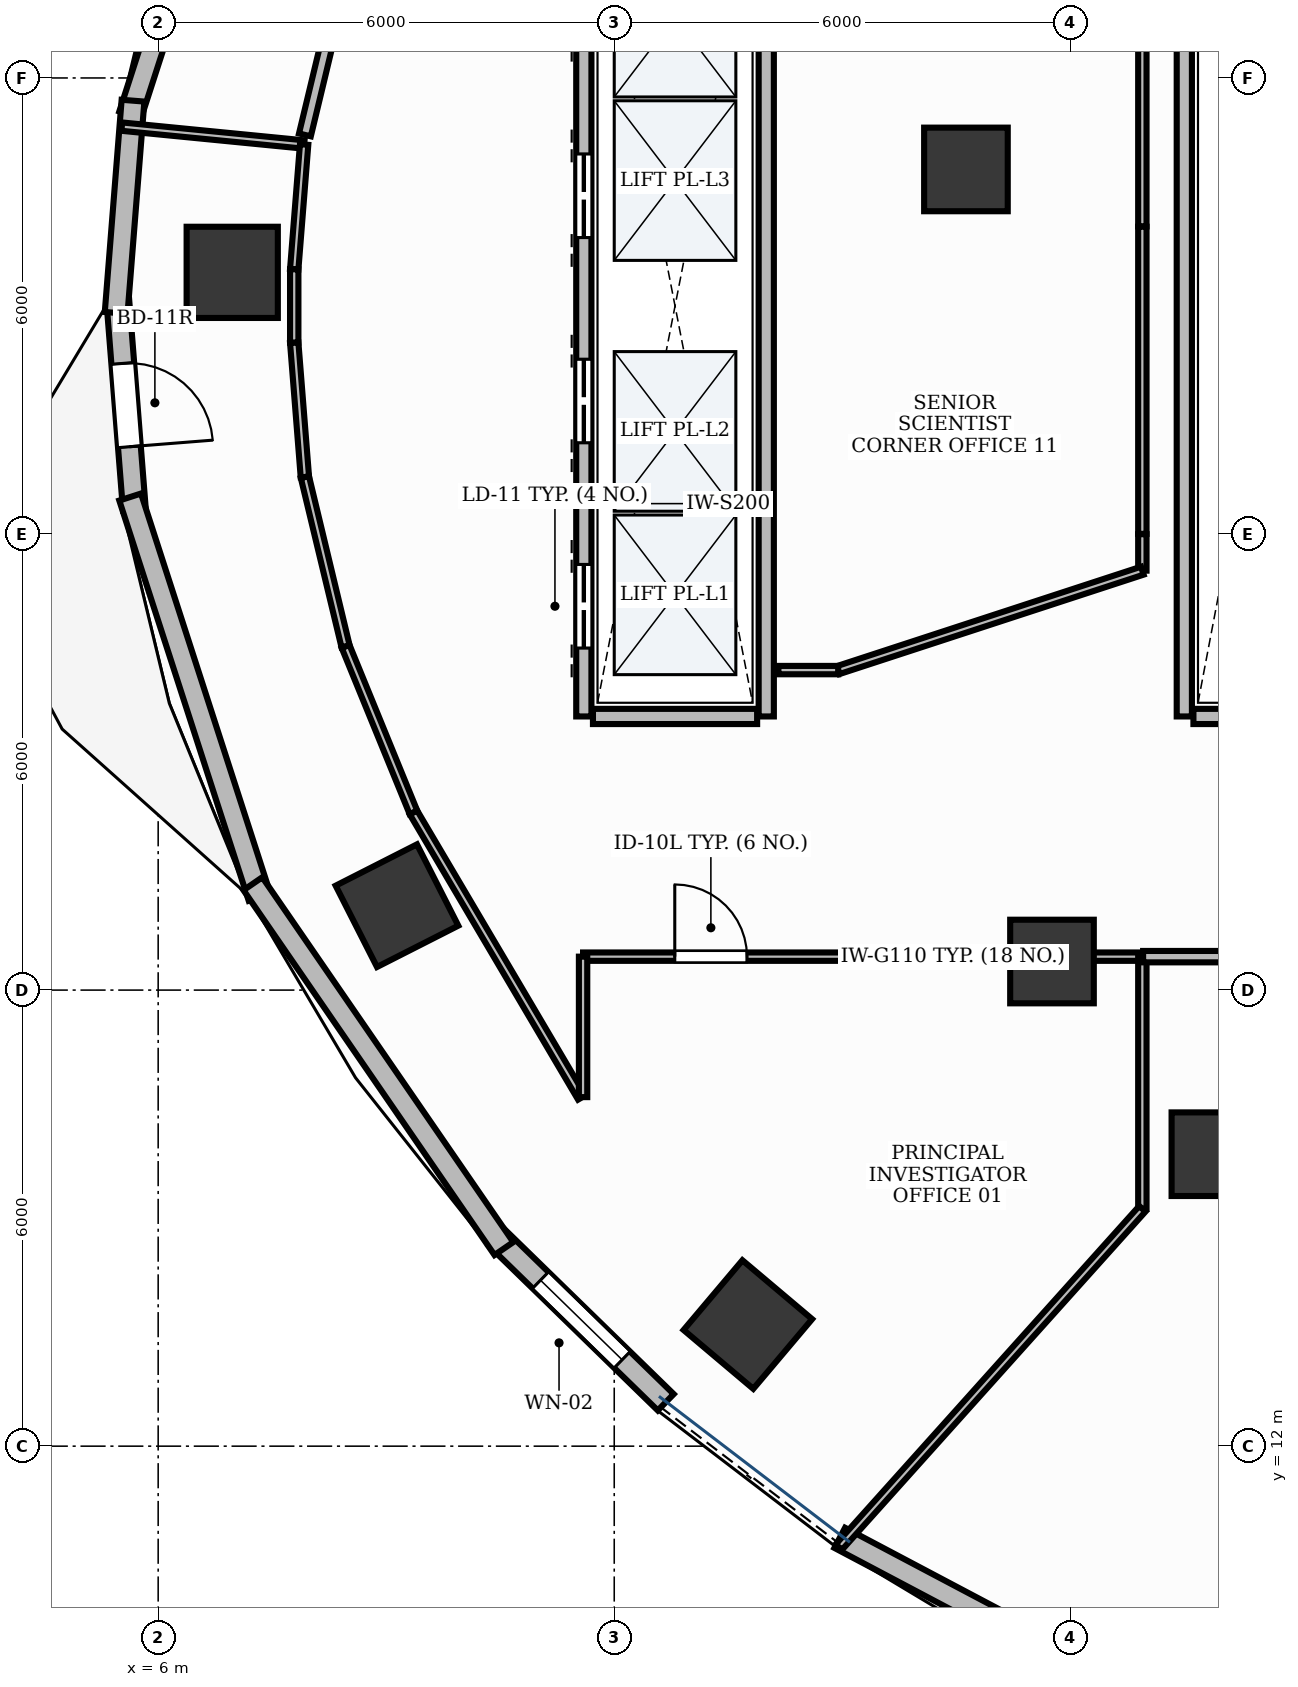
"""IFC4 building model, lengths in metres.
Left out: names, types, materials, properties, quantities, classifications, styles, units other than length and angle.
Written with IfcOpenShell. Run it as: python <this file> out.ifc"""

import sys

from ifc_helpers import new_model, si_unit, direction, frame, frame_2d, origin, origin_2d, place, context, subcontext, project, spatial, rectangle, extrude, element, fill, save


model = new_model("IFC4")
c1 = context("Model", 3, precision=1e-05, world=origin(), true_north=direction((0.0, 1.0)))
c2 = subcontext(c1, "Body", "Model", "MODEL_VIEW")
j1 = project(units=[si_unit("LENGTHUNIT", "METRE"), si_unit("PLANEANGLEUNIT", "RADIAN")], contexts=[c1])
p1 = place(None, origin())
s1 = spatial("IfcSite", under=j1, at=p1, CompositionType="ELEMENT")
p2 = place(p1, origin())
s2 = spatial("IfcBuilding", under=s1, at=p2, CompositionType="ELEMENT")
p3 = place(p2, frame((0.0, 0.0, 90.0)))
s3 = spatial("IfcBuildingStorey", under=s2, at=p3, CompositionType="ELEMENT", Elevation=90.0)
p4 = place(p3, frame((6.974, 27.442, -0.0), z_axis=(0.0, 0.0, 1.0), x_axis=(0.0, 1.0, 0.0)))
e1 = element("IfcColumn", 1, at=p4, inside=s3, PredefinedType="COLUMN", context=c2, shape_type="SweptSolid", body=[
    extrude(rectangle(XDim=1.2, YDim=1.2, at=origin_2d()), origin(), (0.0, 0.0, 1.0), 3.901),
])
p5 = place(p3, frame((16.627, 28.797, -0.0), z_axis=(0.0, 0.0, 1.0), x_axis=(1.0, 0.0, 0.0)))
e2 = element("IfcColumn", 2, at=p5, inside=s3, PredefinedType="COLUMN", context=c2, shape_type="SweptSolid", body=[
    extrude(rectangle(XDim=1.1, YDim=1.1, at=origin_2d()), origin(), (0.0, 0.0, 1.0), 3.901),
])
p6 = place(p3, frame((9.142, 19.111, -0.0), z_axis=(0.0, 0.0, 1.0), x_axis=(-0.453057191132, 0.891481453292, 0.0)))
e3 = element("IfcColumn", 3, at=p6, inside=s3, PredefinedType="COLUMN", context=c2, shape_type="SweptSolid", body=[
    extrude(rectangle(XDim=1.2, YDim=1.2, at=origin_2d()), origin(), (0.0, 0.0, 1.0), 3.901),
])
p7 = place(p3, frame((17.759, 18.376, -0.0), z_axis=(0.0, 0.0, 1.0), x_axis=(1.0, 0.0, 0.0)))
e4 = element("IfcColumn", 4, at=p7, inside=s3, PredefinedType="COLUMN", context=c2, shape_type="SweptSolid", body=[
    extrude(rectangle(XDim=1.1, YDim=1.1, at=origin_2d()), origin(), (0.0, 0.0, 1.0), 3.901),
])
p8 = place(p3, frame((13.758, 13.6, -0.0), z_axis=(0.0, 0.0, 1.0), x_axis=(-0.764246456939, 0.644924300253, 0.0)))
e5 = element("IfcColumn", 5, at=p8, inside=s3, PredefinedType="COLUMN", context=c2, shape_type="SweptSolid", body=[
    extrude(rectangle(XDim=1.2, YDim=1.2, at=origin_2d()), origin(), (0.0, 0.0, 1.0), 3.901),
])
p9 = place(p3, frame((19.883, 15.841, -0.0), z_axis=(0.0, 0.0, 1.0), x_axis=(1.0, 0.0, 0.0)))
e6 = element("IfcColumn", 6, at=p9, inside=s3, PredefinedType="COLUMN", context=c2, shape_type="SweptSolid", body=[
    extrude(rectangle(XDim=1.1, YDim=1.1, at=origin_2d()), origin(), (0.0, 0.0, 1.0), 3.901),
])
p10 = place(p3, frame((20.615, 9.431, -0.0), z_axis=(0.0, 0.0, 1.0), x_axis=(-0.930225540858, 0.366988341962, 0.0)))
e7 = element("IfcColumn", 7, at=p10, inside=s3, PredefinedType="COLUMN", context=c2, shape_type="SweptSolid", body=[
    extrude(rectangle(XDim=1.2, YDim=1.2, at=origin_2d()), origin(), (0.0, 0.0, 1.0), 3.901),
])
p11 = place(p3, frame((5.469, 27.073, 0.0), z_axis=(0.0, 0.0, 1.0), x_axis=(0.079056321743, -0.996870151019, 0.0)))
e8 = element("IfcWall", 8, at=p11, inside=s3, PredefinedType="STANDARD", context=c2, shape_type="SweptSolid", body=[
    extrude(rectangle(XDim=2.761, YDim=0.3, at=frame_2d((1.38, 0.0))), origin(), (0.0, 0.0, 1.0), 3.9),
])
p12 = place(p11, frame((0.83, 0.0, 0.0)))
e9 = element("IfcOpeningElement", 9, at=p12, cuts=e8, PredefinedType="OPENING", context=c2, shape_type="SweptSolid", body=[
    extrude(rectangle(XDim=1.1, YDim=2.15, at=frame_2d((0.55, 1.075))), frame((0.0, 0.165, 0.0), z_axis=(0.0, -1.0, 0.0), x_axis=(1.0, 0.0, 0.0)), (0.0, 0.0, 1.0), 0.33),
])
p13 = place(p3, frame((10.456, 14.743, 0.0), z_axis=(0.0, 0.0, 1.0), x_axis=(0.716099460419, -0.697998254144, 0.0)))
e10 = element("IfcWall", 10, at=p13, inside=s3, PredefinedType="STANDARD", context=c2, shape_type="SweptSolid", body=[
    extrude(rectangle(XDim=3.102, YDim=0.3, at=frame_2d((1.551, 0.0))), origin(), (0.0, 0.0, 1.0), 3.9),
])
p14 = place(p13, frame((0.801, 0.0, 0.95)))
e11 = element("IfcOpeningElement", 11, at=p14, cuts=e10, PredefinedType="OPENING", context=c2, shape_type="SweptSolid", body=[
    extrude(rectangle(XDim=1.5, YDim=1.8, at=frame_2d((0.75, 0.9))), frame((0.0, 0.165, 0.0), z_axis=(0.0, -1.0, 0.0), x_axis=(1.0, 0.0, 0.0)), (0.0, 0.0, 1.0), 0.33),
])
p15 = place(p3, frame((7.334, 34.779, 0.0), z_axis=(0.0, 0.0, 1.0), x_axis=(-0.307599470659, -0.951515930319, 0.0)))
e12 = element("IfcWall", 12, at=p15, inside=s3, PredefinedType="STANDARD", context=c2, shape_type="SweptSolid", body=[
    extrude(rectangle(XDim=5.534, YDim=0.3, at=frame_2d((2.767, 0.0))), origin(), (0.0, 0.0, 1.0), 3.47),
])
p16 = place(p3, frame((5.669, 29.701, 0.0), z_axis=(0.0, 0.0, 1.0), x_axis=(-0.079062676622, -0.996869647028, 0.0)))
e13 = element("IfcWall", 13, at=p16, inside=s3, PredefinedType="STANDARD", context=c2, shape_type="SweptSolid", body=[
    extrude(rectangle(XDim=2.801, YDim=0.3, at=frame_2d((1.4, 0.0))), origin(), (0.0, 0.0, 1.0), 3.47),
])
p17 = place(p3, frame((5.632, 24.487, 0.0), z_axis=(0.0, 0.0, 1.0), x_axis=(0.307599470659, -0.951515930319, 0.0)))
e14 = element("IfcWall", 14, at=p17, inside=s3, PredefinedType="STANDARD", context=c2, shape_type="SweptSolid", body=[
    extrude(rectangle(XDim=5.534, YDim=0.3, at=frame_2d((2.767, 0.0))), origin(), (0.0, 0.0, 1.0), 3.9),
])
p18 = place(p3, frame((7.246, 19.399, 0.0), z_axis=(0.0, 0.0, 1.0), x_axis=(0.566825798999, -0.823837674296, 0.0)))
e15 = element("IfcWall", 15, at=p18, inside=s3, PredefinedType="STANDARD", context=c2, shape_type="SweptSolid", body=[
    extrude(rectangle(XDim=5.826, YDim=0.3, at=frame_2d((2.913, 0.0))), origin(), (0.0, 0.0, 1.0), 3.9),
])
p19 = place(p3, frame((14.967, 10.794, 0.0), z_axis=(0.0, 0.0, 1.0), x_axis=(0.883986649445, -0.467512142734, 0.0)))
e16 = element("IfcWall", 16, at=p19, inside=s3, PredefinedType="STANDARD", context=c2, shape_type="SweptSolid", body=[
    extrude(rectangle(XDim=6.601, YDim=0.3, at=frame_2d((3.301, 0.0))), origin(), (0.0, 0.0, 1.0), 3.9),
])
p20 = place(p3, frame((11.6, 21.6, 0.0), z_axis=(0.0, 0.0, 1.0), x_axis=(0.0, 1.0, 0.0)))
e17 = element("IfcWall", 17, at=p20, inside=s3, PredefinedType="PARTITIONING", context=c2, shape_type="SweptSolid", body=[
    extrude(rectangle(XDim=10.8, YDim=0.2, at=frame_2d((5.4, 0.0))), origin(), (0.0, 0.0, 1.0), 2.91),
])
p21 = place(p20, frame((0.9, 0.0, 0.0)))
e18 = element("IfcOpeningElement", 18, at=p21, cuts=e17, PredefinedType="OPENING", context=c2, shape_type="SweptSolid", body=[
    extrude(rectangle(XDim=1.1, YDim=2.2, at=frame_2d((0.55, 1.1))), frame((0.0, 0.115, 0.0), z_axis=(0.0, -1.0, 0.0), x_axis=(1.0, 0.0, 0.0)), (0.0, 0.0, 1.0), 0.23),
])
p22 = place(p20, frame((3.6, 0.0, 0.0)))
e19 = element("IfcOpeningElement", 19, at=p22, cuts=e17, PredefinedType="OPENING", context=c2, shape_type="SweptSolid", body=[
    extrude(rectangle(XDim=1.1, YDim=2.2, at=frame_2d((0.55, 1.1))), frame((0.0, 0.115, 0.0), z_axis=(0.0, -1.0, 0.0), x_axis=(1.0, 0.0, 0.0)), (0.0, 0.0, 1.0), 0.23),
])
p23 = place(p20, frame((6.3, 0.0, 0.0)))
e20 = element("IfcOpeningElement", 20, at=p23, cuts=e17, PredefinedType="OPENING", context=c2, shape_type="SweptSolid", body=[
    extrude(rectangle(XDim=1.1, YDim=2.2, at=frame_2d((0.55, 1.1))), frame((0.0, 0.115, 0.0), z_axis=(0.0, -1.0, 0.0), x_axis=(1.0, 0.0, 0.0)), (0.0, 0.0, 1.0), 0.23),
])
p24 = place(p20, frame((9.0, 0.0, 0.0)))
e21 = element("IfcOpeningElement", 21, at=p24, cuts=e17, PredefinedType="OPENING", context=c2, shape_type="SweptSolid", body=[
    extrude(rectangle(XDim=1.1, YDim=2.2, at=frame_2d((0.55, 1.1))), frame((0.0, 0.115, 0.0), z_axis=(0.0, -1.0, 0.0), x_axis=(1.0, 0.0, 0.0)), (0.0, 0.0, 1.0), 0.23),
])
p25 = place(p3, frame((14.0, 21.6, 0.0), z_axis=(0.0, 0.0, 1.0), x_axis=(0.0, 1.0, 0.0)))
e22 = element("IfcWall", 22, at=p25, inside=s3, PredefinedType="PARTITIONING", context=c2, shape_type="SweptSolid", body=[
    extrude(rectangle(XDim=10.8, YDim=0.2, at=frame_2d((5.4, 0.0))), origin(), (0.0, 0.0, 1.0), 2.91),
])
p26 = place(p3, frame((11.72, 21.6, 0.0), z_axis=(0.0, 0.0, 1.0), x_axis=(1.0, 0.0, 0.0)))
e23 = element("IfcWall", 23, at=p26, inside=s3, PredefinedType="PARTITIONING", context=c2, shape_type="SweptSolid", body=[
    extrude(rectangle(XDim=2.16, YDim=0.2, at=frame_2d((1.08, 0.0))), origin(), (0.0, 0.0, 1.0), 2.91),
])
p27 = place(p3, frame((19.5, 21.6, 0.0), z_axis=(0.0, 0.0, 1.0), x_axis=(0.0, 1.0, 0.0)))
e24 = element("IfcWall", 24, at=p27, inside=s3, PredefinedType="PARTITIONING", context=c2, shape_type="SweptSolid", body=[
    extrude(rectangle(XDim=10.8, YDim=0.2, at=frame_2d((5.4, 0.0))), origin(), (0.0, 0.0, 1.0), 2.91),
])
p28 = place(p3, frame((19.62, 21.6, 0.0), z_axis=(0.0, 0.0, 1.0), x_axis=(1.0, 0.0, 0.0)))
e25 = element("IfcWall", 25, at=p28, inside=s3, PredefinedType="PARTITIONING", context=c2, shape_type="SweptSolid", body=[
    extrude(rectangle(XDim=2.11, YDim=0.2, at=frame_2d((1.055, 0.0))), origin(), (0.0, 0.0, 1.0), 2.91),
])
p29 = place(p3, frame((11.59, 18.44, 0.0), z_axis=(0.0, 0.0, 1.0), x_axis=(1.0, 0.0, 0.0)))
e26 = element("IfcWall", 26, at=p29, inside=s3, PredefinedType="MOVABLE", context=c2, shape_type="SweptSolid", body=[
    extrude(rectangle(XDim=7.358, YDim=0.11, at=frame_2d((3.679, 0.0))), origin(), (0.0, 0.0, 1.0), 2.91),
])
p30 = place(p29, frame((1.206, 0.0, 0.0)))
e27 = element("IfcOpeningElement", 27, at=p30, cuts=e26, PredefinedType="OPENING", context=c2, shape_type="SweptSolid", body=[
    extrude(rectangle(XDim=0.95, YDim=2.15, at=frame_2d((0.475, 1.075))), frame((0.0, 0.07, 0.0), z_axis=(0.0, -1.0, 0.0), x_axis=(1.0, 0.0, 0.0)), (0.0, 0.0, 1.0), 0.14),
])
p31 = place(p3, frame((5.521, 29.36, 0.0), z_axis=(0.0, 0.0, 1.0), x_axis=(0.99523083929, -0.097547816614, 0.0)))
e28 = element("IfcWall", 28, at=p31, inside=s3, PredefinedType="MOVABLE", context=c2, shape_type="SweptSolid", body=[
    extrude(rectangle(XDim=2.41, YDim=0.11, at=frame_2d((1.205, 0.0))), origin(), (0.0, 0.0, 1.0), 2.91),
])
p32 = place(p3, frame((7.92, 29.125, 0.0), z_axis=(0.0, 0.0, 1.0), x_axis=(-0.079067162534, -0.996869291236, 0.0)))
e29 = element("IfcWall", 29, at=p32, inside=s3, PredefinedType="MOVABLE", context=c2, shape_type="SweptSolid", body=[
    extrude(rectangle(XDim=1.646, YDim=0.11, at=frame_2d((0.823, 0.0))), origin(), (0.0, 0.0, 1.0), 2.91),
])
p33 = place(p3, frame((7.79, 27.483, 0.0), z_axis=(0.0, 0.0, 1.0), x_axis=(0.0, -1.0, 0.0)))
e30 = element("IfcWall", 30, at=p33, inside=s3, PredefinedType="MOVABLE", context=c2, shape_type="SweptSolid", body=[
    extrude(rectangle(XDim=0.966, YDim=0.11, at=frame_2d((0.483, 0.0))), origin(), (0.0, 0.0, 1.0), 2.91),
])
p34 = place(p3, frame((7.79, 26.516, 0.0), z_axis=(0.0, 0.0, 1.0), x_axis=(0.079131522864, -0.996864184375, 0.0)))
e31 = element("IfcWall", 31, at=p34, inside=s3, PredefinedType="MOVABLE", context=c2, shape_type="SweptSolid", body=[
    extrude(rectangle(XDim=1.771, YDim=0.11, at=frame_2d((0.885, 0.0))), origin(), (0.0, 0.0, 1.0), 2.91),
])
p35 = place(p3, frame((7.93, 24.749, 0.0), z_axis=(0.0, 0.0, 1.0), x_axis=(0.233675196412, -0.972314713754, 0.0)))
e32 = element("IfcWall", 32, at=p35, inside=s3, PredefinedType="MOVABLE", context=c2, shape_type="SweptSolid", body=[
    extrude(rectangle(XDim=2.291, YDim=0.11, at=frame_2d((1.146, 0.0))), origin(), (0.0, 0.0, 1.0), 2.91),
])
p36 = place(p3, frame((8.466, 22.52, 0.0), z_axis=(0.0, 0.0, 1.0), x_axis=(0.378306283753, -0.925680482495, 0.0)))
e33 = element("IfcWall", 33, at=p36, inside=s3, PredefinedType="MOVABLE", context=c2, shape_type="SweptSolid", body=[
    extrude(rectangle(XDim=2.358, YDim=0.11, at=frame_2d((1.179, 0.0))), origin(), (0.0, 0.0, 1.0), 2.91),
])
p37 = place(p3, frame((9.359, 20.336, 0.0), z_axis=(0.0, 0.0, 1.0), x_axis=(0.508164254342, -0.86126017591, 0.0)))
e34 = element("IfcWall", 34, at=p37, inside=s3, PredefinedType="MOVABLE", context=c2, shape_type="SweptSolid", body=[
    extrude(rectangle(XDim=4.353, YDim=0.11, at=frame_2d((2.177, 0.0))), origin(), (0.0, 0.0, 1.0), 2.91),
])
p38 = place(p3, frame((11.59, 16.592, 0.0), z_axis=(0.0, 0.0, 1.0), x_axis=(0.0, 1.0, 0.0)))
e35 = element("IfcWall", 35, at=p38, inside=s3, PredefinedType="MOVABLE", context=c2, shape_type="SweptSolid", body=[
    extrude(rectangle(XDim=1.848, YDim=0.11, at=frame_2d((0.924, 0.0))), origin(), (0.0, 0.0, 1.0), 2.91),
])
p39 = place(p3, frame((18.948, 18.44, 0.0), z_axis=(0.0, 0.0, 1.0), x_axis=(0.0, -1.0, 0.0)))
e36 = element("IfcWall", 36, at=p39, inside=s3, PredefinedType="MOVABLE", context=c2, shape_type="SweptSolid", body=[
    extrude(rectangle(XDim=3.317, YDim=0.11, at=frame_2d((1.659, 0.0))), origin(), (0.0, 0.0, 1.0), 2.91),
])
p40 = place(p3, frame((18.948, 15.123, 0.0), z_axis=(0.0, 0.0, 1.0), x_axis=(-0.667833771006, -0.744310455592, 0.0)))
e37 = element("IfcWall", 37, at=p40, inside=s3, PredefinedType="MOVABLE", context=c2, shape_type="SweptSolid", body=[
    extrude(rectangle(XDim=5.979, YDim=0.11, at=frame_2d((2.99, 0.0))), origin(), (0.0, 0.0, 1.0), 2.91),
])
p41 = place(p3, frame((18.958, 18.44, 0.0), z_axis=(0.0, 0.0, 1.0), x_axis=(1.0, 0.0, 0.0)))
e38 = element("IfcWall", 38, at=p41, inside=s3, PredefinedType="PARTITIONING", context=c2, shape_type="SweptSolid", body=[
    extrude(rectangle(XDim=2.832, YDim=0.15, at=frame_2d((1.416, 0.0))), origin(), (0.0, 0.0, 1.0), 2.91),
])
p42 = place(p3, frame((8.466, 31.479, 0.0), z_axis=(0.0, 0.0, 1.0), x_axis=(-0.233675196412, -0.972314713754, 0.0)))
e39 = element("IfcWall", 39, at=p42, inside=s3, PredefinedType="PARTITIONING", context=c2, shape_type="SweptSolid", body=[
    extrude(rectangle(XDim=2.291, YDim=0.16, at=frame_2d((1.146, 0.0))), origin(), (0.0, 0.0, 1.0), 2.91),
])
p43 = place(p3, frame((18.948, 31.522, 0.0), z_axis=(0.0, 0.0, 1.0), x_axis=(0.0, -1.0, 0.0)))
e40 = element("IfcWall", 40, at=p43, inside=s3, PredefinedType="MOVABLE", context=c2, shape_type="SweptSolid", body=[
    extrude(rectangle(XDim=3.475, YDim=0.11, at=frame_2d((1.738, 0.0))), origin(), (0.0, 0.0, 1.0), 2.91),
])
p44 = place(p3, frame((18.948, 28.043, 0.0), z_axis=(0.0, 0.0, 1.0), x_axis=(0.0, -1.0, 0.0)))
e41 = element("IfcWall", 41, at=p44, inside=s3, PredefinedType="MOVABLE", context=c2, shape_type="SweptSolid", body=[
    extrude(rectangle(XDim=4.041, YDim=0.11, at=frame_2d((2.021, 0.0))), origin(), (0.0, 0.0, 1.0), 2.91),
])
p45 = place(p3, frame((18.948, 23.998, 0.0), z_axis=(0.0, 0.0, 1.0), x_axis=(0.0, -1.0, 0.0)))
e42 = element("IfcWall", 42, at=p45, inside=s3, PredefinedType="MOVABLE", context=c2, shape_type="SweptSolid", body=[
    extrude(rectangle(XDim=0.48, YDim=0.11, at=frame_2d((0.24, 0.0))), origin(), (0.0, 0.0, 1.0), 2.91),
])
p46 = place(p3, frame((18.948, 23.518, 0.0), z_axis=(0.0, 0.0, 1.0), x_axis=(-0.950522660163, -0.31065523095, 0.0)))
e43 = element("IfcWall", 43, at=p46, inside=s3, PredefinedType="MOVABLE", context=c2, shape_type="SweptSolid", body=[
    extrude(rectangle(XDim=4.21, YDim=0.11, at=frame_2d((2.105, 0.0))), origin(), (0.0, 0.0, 1.0), 2.91),
])
p47 = place(p3, frame((14.946, 22.21, 0.0), z_axis=(0.0, 0.0, 1.0), x_axis=(-1.0, 0.0, 0.0)))
e44 = element("IfcWall", 44, at=p47, inside=s3, PredefinedType="MOVABLE", context=c2, shape_type="SweptSolid", body=[
    extrude(rectangle(XDim=0.786, YDim=0.11, at=frame_2d((0.393, 0.0))), origin(), (0.0, 0.0, 1.0), 2.91),
])
p48 = place(p12, origin())
e45 = element("IfcDoor", 45, at=p48, inside=s3, OperationType="SINGLE_SWING_RIGHT", PredefinedType="DOOR", context=c2, shape_type="SweptSolid", body=[
    extrude(rectangle(XDim=1.1, YDim=2.15, at=frame_2d((0.55, 1.075))), frame((0.0, 0.025, 0.0), z_axis=(0.0, -1.0, 0.0), x_axis=(1.0, 0.0, 0.0)), (0.0, 0.0, 1.0), 0.05),
])
fill(e9, e45)
p49 = place(p14, origin())
e46 = element("IfcWindow", 46, at=p49, inside=s3, PartitioningType="DOUBLE_PANEL_VERTICAL", PredefinedType="WINDOW", context=c2, shape_type="SweptSolid", body=[
    extrude(rectangle(XDim=1.5, YDim=1.8, at=frame_2d((0.75, 0.9))), frame((0.0, 0.03, 0.0), z_axis=(0.0, -1.0, 0.0), x_axis=(1.0, 0.0, 0.0)), (0.0, 0.0, 1.0), 0.06),
])
fill(e11, e46)
p50 = place(p21, origin())
e47 = element("IfcDoor", 47, at=p50, inside=s3, OperationType="DOUBLE_DOOR_SLIDING", PredefinedType="DOOR", context=c2, shape_type="SweptSolid", body=[
    extrude(rectangle(XDim=1.1, YDim=2.2, at=frame_2d((0.55, 1.1))), frame((0.0, 0.025, 0.0), z_axis=(0.0, -1.0, 0.0), x_axis=(1.0, 0.0, 0.0)), (0.0, 0.0, 1.0), 0.05),
])
fill(e18, e47)
p51 = place(p22, origin())
e48 = element("IfcDoor", 48, at=p51, inside=s3, OperationType="DOUBLE_DOOR_SLIDING", PredefinedType="DOOR", context=c2, shape_type="SweptSolid", body=[
    extrude(rectangle(XDim=1.1, YDim=2.2, at=frame_2d((0.55, 1.1))), frame((0.0, 0.025, 0.0), z_axis=(0.0, -1.0, 0.0), x_axis=(1.0, 0.0, 0.0)), (0.0, 0.0, 1.0), 0.05),
])
fill(e19, e48)
p52 = place(p23, origin())
e49 = element("IfcDoor", 49, at=p52, inside=s3, OperationType="DOUBLE_DOOR_SLIDING", PredefinedType="DOOR", context=c2, shape_type="SweptSolid", body=[
    extrude(rectangle(XDim=1.1, YDim=2.2, at=frame_2d((0.55, 1.1))), frame((0.0, 0.025, 0.0), z_axis=(0.0, -1.0, 0.0), x_axis=(1.0, 0.0, 0.0)), (0.0, 0.0, 1.0), 0.05),
])
fill(e20, e49)
p53 = place(p30, origin())
e50 = element("IfcDoor", 50, at=p53, inside=s3, OperationType="SINGLE_SWING_LEFT", PredefinedType="DOOR", context=c2, shape_type="SweptSolid", body=[
    extrude(rectangle(XDim=0.95, YDim=2.15, at=frame_2d((0.475, 1.075))), frame((0.0, 0.025, 0.0), z_axis=(0.0, -1.0, 0.0), x_axis=(1.0, 0.0, 0.0)), (0.0, 0.0, 1.0), 0.05),
])
fill(e27, e50)
save(model, sys.argv[1])
